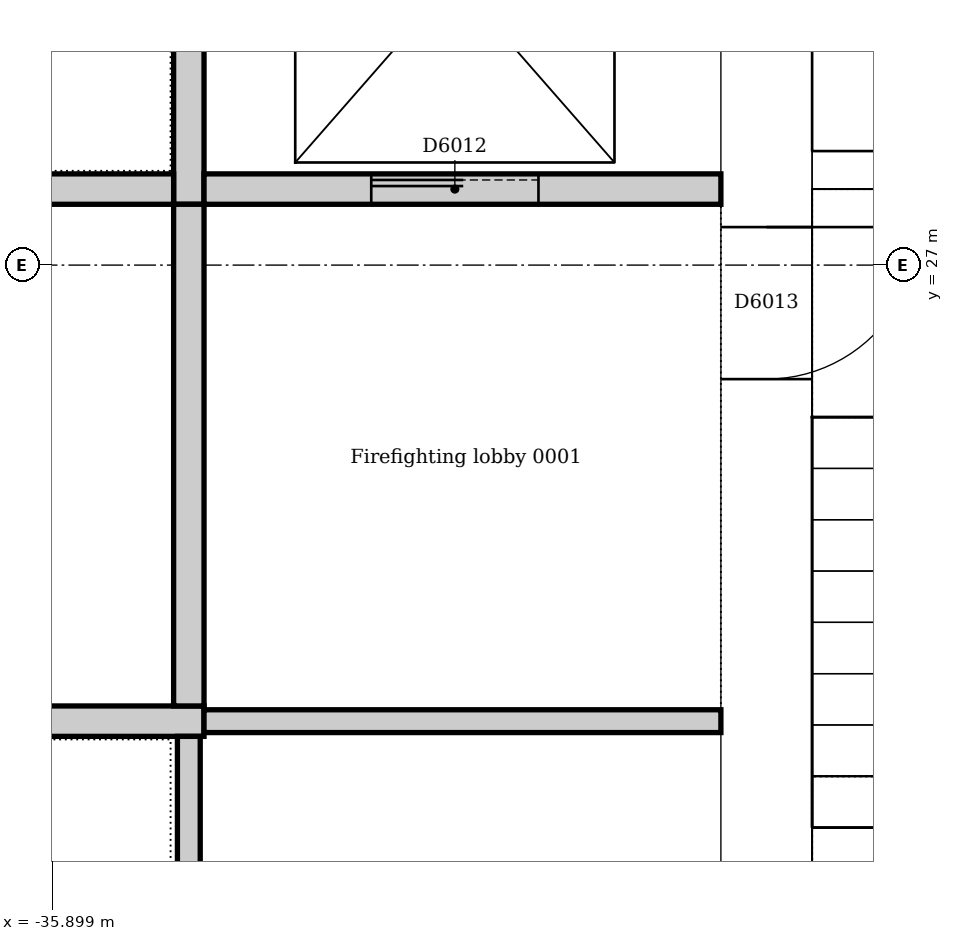
"""IFC4 building model, lengths in metres.
Left out: names, types, materials, properties, quantities, classifications, styles, units other than length and angle.
Written with IfcOpenShell. Run it as: python <this file> out.ifc"""

import sys

from ifc_helpers import new_model, si_unit, direction, frame, frame_2d, origin, place, context, subcontext, project, spatial, rectangle, extrude, element, fill, save


model = new_model("IFC4")
c1 = context("Model", 3, precision=1e-05, world=origin(), true_north=direction((0.0, 1.0)))
c2 = subcontext(c1, "Body", "Model", "MODEL_VIEW")
j1 = project(units=[si_unit("LENGTHUNIT", "METRE"), si_unit("PLANEANGLEUNIT", "RADIAN")], contexts=[c1])
p1 = place(None, origin())
s1 = spatial("IfcSite", under=j1, at=p1, CompositionType="ELEMENT")
p2 = place(p1, origin())
s2 = spatial("IfcBuilding", under=s1, at=p2, CompositionType="ELEMENT")
p3 = place(p2, frame((0.0, 0.0, -5.0)))
s3 = spatial("IfcBuildingStorey", under=s2, at=p3, CompositionType="ELEMENT", Elevation=-5.0)
p4 = place(p3, frame((-31.2, 21.0, 0.0), z_axis=(0.0, 0.0, 1.0), x_axis=(0.0, 1.0, 0.0)))
e1 = element("IfcWall", 1, at=p4, inside=s3, PredefinedType="SOLIDWALL", context=c2, shape_type="SweptSolid", body=[
    extrude(rectangle(XDim=9.5, YDim=0.6, at=frame_2d((4.75, 0.0))), origin(), (0.0, 0.0, 1.0), 5.0),
])
p5 = place(p4, frame((5.25, 0.0, 0.0)))
e2 = element("IfcOpeningElement", 2, at=p5, cuts=e1, PredefinedType="OPENING", context=c2, shape_type="SweptSolid", body=[
    extrude(rectangle(XDim=1.0, YDim=2.1, at=frame_2d((0.5, 1.05))), frame((0.0, 0.31, 0.0), z_axis=(0.0, -1.0, 0.0), x_axis=(1.0, 0.0, 0.0)), (0.0, 0.0, 1.0), 0.62),
])
p6 = place(p3, frame((-27.36, 27.625, 0.0), z_axis=(0.0, 0.0, 1.0), x_axis=(-1.0, 0.0, 0.0)))
e3 = element("IfcWall", 3, at=p6, inside=s3, PredefinedType="SOLIDWALL", context=c2, shape_type="SweptSolid", body=[
    extrude(rectangle(XDim=3.54, YDim=0.25, at=frame_2d((1.77, 0.0))), origin(), (0.0, 0.0, 1.0), 5.0),
])
p7 = place(p6, frame((1.69, 0.0, 0.0)))
e4 = element("IfcOpeningElement", 4, at=p7, cuts=e3, PredefinedType="OPENING", context=c2, shape_type="SweptSolid", body=[
    extrude(rectangle(XDim=1.1, YDim=2.1, at=frame_2d((0.55, 1.05))), frame((0.0, 0.135, 0.0), z_axis=(0.0, -1.0, 0.0), x_axis=(1.0, 0.0, 0.0)), (0.0, 0.0, 1.0), 0.27),
])
p8 = place(p3, frame((-34.9, 24.0, 0.0), z_axis=(0.0, 0.0, 1.0), x_axis=(-1.0, 0.0, 0.0)))
e5 = element("IfcWall", 5, at=p8, inside=s3, PredefinedType="SOLIDWALL", context=c2, shape_type="SweptSolid", body=[
    extrude(rectangle(XDim=3.5, YDim=0.2, at=frame_2d((1.75, 0.0))), origin(), (0.0, 0.0, 1.0), 5.0),
])
p9 = place(p3, frame((-35.0, 27.4, 0.0), z_axis=(0.0, 0.0, 1.0), x_axis=(0.0, 1.0, 0.0)))
e6 = element("IfcWall", 6, at=p9, inside=s3, PredefinedType="SOLIDWALL", context=c2, shape_type="SweptSolid", body=[
    extrude(rectangle(XDim=2.85, YDim=0.2, at=frame_2d((1.425, 0.0))), origin(), (0.0, 0.0, 1.0), 5.0),
])
p10 = place(p3, frame((-38.4, 27.5, 0.0), z_axis=(0.0, 0.0, 1.0), x_axis=(1.0, 0.0, 0.0)))
e7 = element("IfcWall", 7, at=p10, inside=s3, PredefinedType="SOLIDWALL", context=c2, shape_type="SweptSolid", body=[
    extrude(rectangle(XDim=3.3, YDim=0.2, at=frame_2d((1.65, 0.0))), origin(), (0.0, 0.0, 1.0), 5.0),
])
p11 = place(p3, frame((-34.9, 27.5, 0.0), z_axis=(0.0, 0.0, 1.0), x_axis=(1.0, 0.0, 0.0)))
e8 = element("IfcWall", 8, at=p11, inside=s3, PredefinedType="SOLIDWALL", context=c2, shape_type="SweptSolid", body=[
    extrude(rectangle(XDim=3.4, YDim=0.2, at=frame_2d((1.7, 0.0))), origin(), (0.0, 0.0, 1.0), 5.0),
])
p12 = place(p11, frame((1.1, 0.0, 0.0)))
e9 = element("IfcOpeningElement", 9, at=p12, cuts=e8, PredefinedType="OPENING", context=c2, shape_type="SweptSolid", body=[
    extrude(rectangle(XDim=1.1, YDim=2.1, at=frame_2d((0.55, 1.05))), frame((0.0, 0.11, 0.0), z_axis=(0.0, -1.0, 0.0), x_axis=(1.0, 0.0, 0.0)), (0.0, 0.0, 1.0), 0.22),
])
p13 = place(p3, frame((-35.0, 24.1, 0.0), z_axis=(0.0, 0.0, 1.0), x_axis=(0.0, 1.0, 0.0)))
e10 = element("IfcWall", 10, at=p13, inside=s3, PredefinedType="SOLIDWALL", context=c2, shape_type="SweptSolid", body=[
    extrude(rectangle(XDim=3.3, YDim=0.2, at=frame_2d((1.65, 0.0))), origin(), (0.0, 0.0, 1.0), 5.0),
])
p14 = place(p3, frame((-35.0, 21.0, 0.0), z_axis=(0.0, 0.0, 1.0), x_axis=(0.0, 1.0, 0.0)))
e11 = element("IfcWall", 11, at=p14, inside=s3, PredefinedType="SOLIDWALL", context=c2, shape_type="SweptSolid", body=[
    extrude(rectangle(XDim=2.9, YDim=0.15, at=frame_2d((1.45, 0.0))), origin(), (0.0, 0.0, 1.0), 5.0),
])
p15 = place(p3, frame((-31.5, 24.0, 0.0), z_axis=(0.0, 0.0, 1.0), x_axis=(-1.0, 0.0, 0.0)))
e12 = element("IfcWall", 12, at=p15, inside=s3, PredefinedType="SOLIDWALL", context=c2, shape_type="SweptSolid", body=[
    extrude(rectangle(XDim=3.4, YDim=0.15, at=frame_2d((1.7, 0.0))), origin(), (0.0, 0.0, 1.0), 5.0),
])
p16 = place(p12, origin())
e13 = element("IfcDoor", 13, at=p16, inside=s3, OperationType="SLIDING_TO_LEFT", PredefinedType="DOOR", context=c2, shape_type="SweptSolid", body=[
    extrude(rectangle(XDim=1.1, YDim=2.1, at=frame_2d((0.55, 1.05))), frame((0.0, 0.025, 0.0), z_axis=(0.0, -1.0, 0.0), x_axis=(1.0, 0.0, 0.0)), (0.0, 0.0, 1.0), 0.05),
])
fill(e9, e13)
p17 = place(p5, frame((1.0, 0.0, 0.0), z_axis=(0.0, 0.0, 1.0), x_axis=(-1.0, 0.0, 0.0)))
e14 = element("IfcDoor", 14, at=p17, inside=s3, OperationType="SINGLE_SWING_LEFT", PredefinedType="DOOR", context=c2, shape_type="SweptSolid", body=[
    extrude(rectangle(XDim=1.0, YDim=2.1, at=frame_2d((0.5, 1.05))), frame((0.0, 0.025, 0.0), z_axis=(0.0, -1.0, 0.0), x_axis=(1.0, 0.0, 0.0)), (0.0, 0.0, 1.0), 0.05),
])
fill(e2, e14)
save(model, sys.argv[1])
